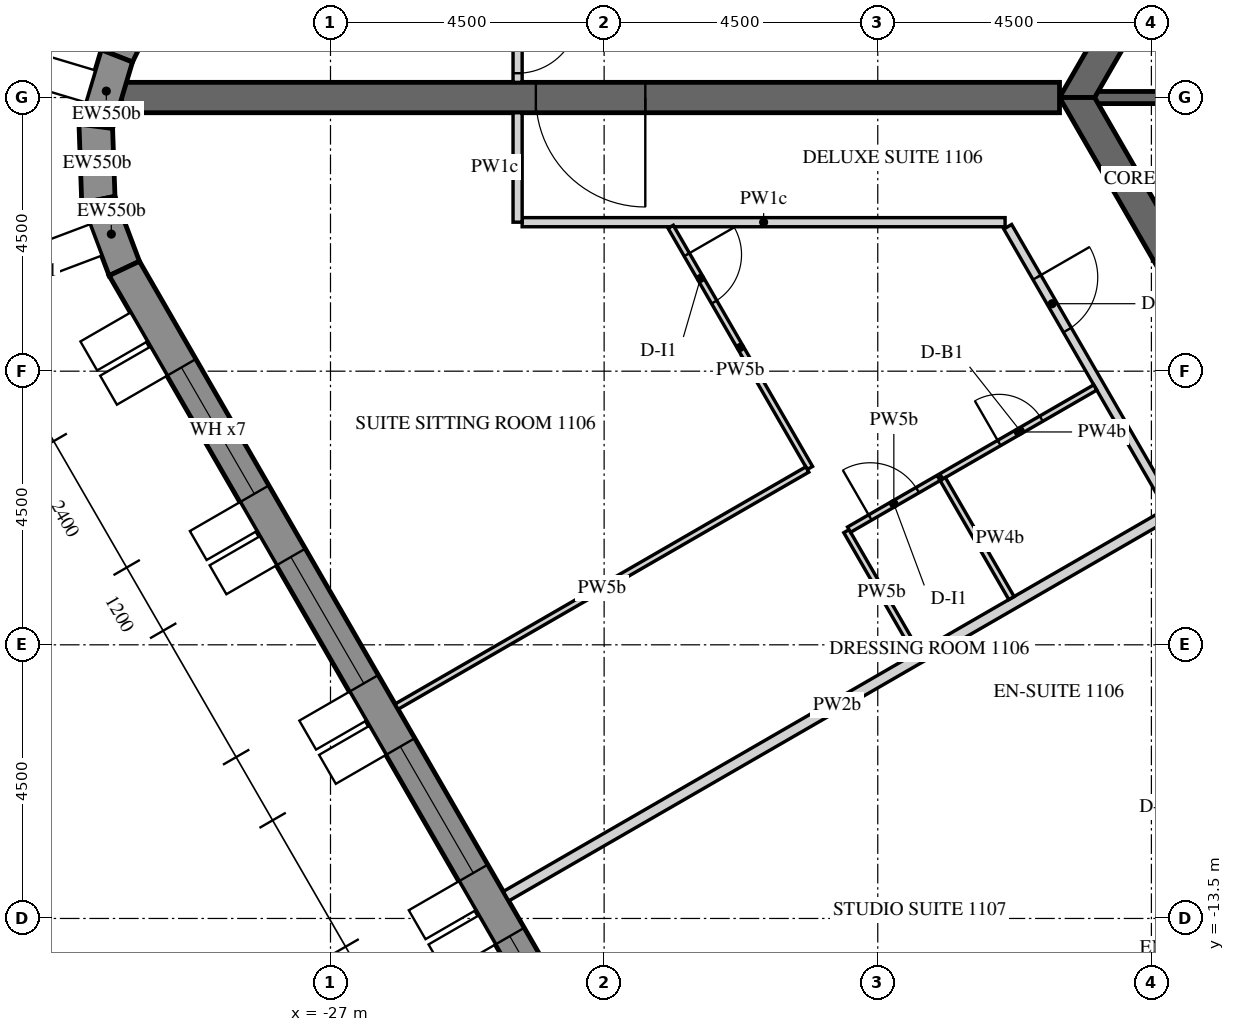
"""IFC4 building model, lengths in metres.
Left out: names, types, materials, properties, quantities, classifications, styles, units other than length and angle.
Written with IfcOpenShell. Run it as: python <this file> out.ifc"""

import sys

from ifc_helpers import new_model, si_unit, direction, frame, frame_2d, origin, place, context, subcontext, project, spatial, polyline, rectangle, outline, extrude, element, fill, save


model = new_model("IFC4")
c1 = context("Model", 3, precision=1e-05, world=origin(), true_north=direction((0.0, 1.0)))
c2 = subcontext(c1, "Body", "Model", "MODEL_VIEW")
j1 = project(units=[si_unit("LENGTHUNIT", "METRE"), si_unit("PLANEANGLEUNIT", "RADIAN")], contexts=[c1])
p1 = place(None, origin())
s1 = spatial("IfcSite", under=j1, at=p1, CompositionType="ELEMENT")
p2 = place(p1, origin())
s2 = spatial("IfcBuilding", under=s1, at=p2, CompositionType="ELEMENT")
p3 = place(p2, frame((0.0, 0.0, 152.7)))
s3 = spatial("IfcBuildingStorey", under=s2, at=p3, CompositionType="ELEMENT", Elevation=152.7)
p4 = place(p3, frame((-18.345, 25.633, 0.0), z_axis=(0.0, 0.0, 1.0), x_axis=(-0.43837181828, -0.898793718791, 0.0)))
e1 = element("IfcWall", 1, at=p4, inside=s3, PredefinedType="SOLIDWALL", context=c2, shape_type="SweptSolid", body=[
    extrude(outline(polyline([(-0.026, -0.275), (27.78, -0.275), (27.735, 0.275), (0.026, 0.275), (-0.026, -0.275)])), origin(), (0.0, 0.0, 1.0), 3.75),
])
p5 = place(p4, frame((1.879, 0.0, 0.9)))
e2 = element("IfcOpeningElement", 2, at=p5, cuts=e1, PredefinedType="OPENING", context=c2, shape_type="SweptSolid", body=[
    extrude(rectangle(XDim=2.4, YDim=2.4, at=frame_2d((1.2, 1.2))), frame((0.0, 0.285, 0.0), z_axis=(0.0, -1.0, 0.0), x_axis=(1.0, 0.0, 0.0)), (0.0, 0.0, 1.0), 0.57),
])
p6 = place(p4, frame((5.479, 0.0, 0.9)))
e3 = element("IfcOpeningElement", 3, at=p6, cuts=e1, PredefinedType="OPENING", context=c2, shape_type="SweptSolid", body=[
    extrude(rectangle(XDim=2.4, YDim=2.4, at=frame_2d((1.2, 1.2))), frame((0.0, 0.285, 0.0), z_axis=(0.0, -1.0, 0.0), x_axis=(1.0, 0.0, 0.0)), (0.0, 0.0, 1.0), 0.57),
])
p7 = place(p4, frame((9.079, 0.0, 0.9)))
e4 = element("IfcOpeningElement", 4, at=p7, cuts=e1, PredefinedType="OPENING", context=c2, shape_type="SweptSolid", body=[
    extrude(rectangle(XDim=2.4, YDim=2.4, at=frame_2d((1.2, 1.2))), frame((0.0, 0.285, 0.0), z_axis=(0.0, -1.0, 0.0), x_axis=(1.0, 0.0, 0.0)), (0.0, 0.0, 1.0), 0.57),
])
p8 = place(p4, frame((12.679, 0.0, 0.9)))
e5 = element("IfcOpeningElement", 5, at=p8, cuts=e1, PredefinedType="OPENING", context=c2, shape_type="SweptSolid", body=[
    extrude(rectangle(XDim=2.4, YDim=2.4, at=frame_2d((1.2, 1.2))), frame((0.0, 0.285, 0.0), z_axis=(0.0, -1.0, 0.0), x_axis=(1.0, 0.0, 0.0)), (0.0, 0.0, 1.0), 0.57),
])
p9 = place(p4, frame((16.279, 0.0, 0.9)))
e6 = element("IfcOpeningElement", 6, at=p9, cuts=e1, PredefinedType="OPENING", context=c2, shape_type="SweptSolid", body=[
    extrude(rectangle(XDim=2.4, YDim=2.4, at=frame_2d((1.2, 1.2))), frame((0.0, 0.285, 0.0), z_axis=(0.0, -1.0, 0.0), x_axis=(1.0, 0.0, 0.0)), (0.0, 0.0, 1.0), 0.57),
])
p10 = place(p4, frame((19.879, 0.0, 0.9)))
e7 = element("IfcOpeningElement", 7, at=p10, cuts=e1, PredefinedType="OPENING", context=c2, shape_type="SweptSolid", body=[
    extrude(rectangle(XDim=2.4, YDim=2.4, at=frame_2d((1.2, 1.2))), frame((0.0, 0.285, 0.0), z_axis=(0.0, -1.0, 0.0), x_axis=(1.0, 0.0, 0.0)), (0.0, 0.0, 1.0), 0.57),
])
p11 = place(p4, frame((23.479, 0.0, 0.9)))
e8 = element("IfcOpeningElement", 8, at=p11, cuts=e1, PredefinedType="OPENING", context=c2, shape_type="SweptSolid", body=[
    extrude(rectangle(XDim=2.4, YDim=2.4, at=frame_2d((1.2, 1.2))), frame((0.0, 0.285, 0.0), z_axis=(0.0, -1.0, 0.0), x_axis=(1.0, 0.0, 0.0)), (0.0, 0.0, 1.0), 0.57),
])
p12 = place(p3, frame((-30.513, 0.684, 0.0), z_axis=(0.0, 0.0, 1.0), x_axis=(-0.286736058109, -0.958009620505, 0.0)))
e9 = element("IfcWall", 9, at=p12, inside=s3, PredefinedType="SOLIDWALL", context=c2, shape_type="SweptSolid", body=[
    extrude(outline(polyline([(-0.022, -0.275), (1.253, -0.275), (1.163, 0.275), (0.022, 0.275), (-0.022, -0.275)])), origin(), (0.0, 0.0, 1.0), 3.75),
])
p13 = place(p3, frame((-30.86, -0.473, 0.0), z_axis=(0.0, 0.0, 1.0), x_axis=(0.03495638276, -0.999388838893, 0.0)))
e10 = element("IfcWall", 10, at=p13, inside=s3, PredefinedType="SOLIDWALL", context=c2, shape_type="SweptSolid", body=[
    extrude(outline(polyline([(-0.045, -0.275), (1.253, -0.275), (1.163, 0.275), (0.045, 0.275), (-0.045, -0.275)])), origin(), (0.0, 0.0, 1.0), 3.75),
])
p14 = place(p3, frame((-30.817, -1.681, 0.0), z_axis=(0.0, 0.0, 1.0), x_axis=(0.352850303963, -0.935679786569, 0.0)))
e11 = element("IfcWall", 11, at=p14, inside=s3, PredefinedType="SOLIDWALL", context=c2, shape_type="SweptSolid", body=[
    extrude(outline(polyline([(-0.045, -0.275), (1.23, -0.275), (1.186, 0.275), (0.045, 0.275), (-0.045, -0.275)])), origin(), (0.0, 0.0, 1.0), 3.75),
])
p15 = place(p3, frame((-30.391, -2.811, 0.0), z_axis=(0.0, 0.0, 1.0), x_axis=(0.499998569178, -0.866026229868, 0.0)))
e12 = element("IfcWall", 12, at=p15, inside=s3, PredefinedType="SOLIDWALL", context=c2, shape_type="SweptSolid", body=[
    extrude(outline(polyline([(-0.022, -0.275), (27.783, -0.275), (27.732, 0.275), (0.022, 0.275), (-0.022, -0.275)])), origin(), (0.0, 0.0, 1.0), 3.75),
])
p16 = place(p15, frame((1.879, 0.0, 0.9)))
e13 = element("IfcOpeningElement", 13, at=p16, cuts=e12, PredefinedType="OPENING", context=c2, shape_type="SweptSolid", body=[
    extrude(rectangle(XDim=2.4, YDim=2.4, at=frame_2d((1.2, 1.2))), frame((0.0, 0.285, 0.0), z_axis=(0.0, -1.0, 0.0), x_axis=(1.0, 0.0, 0.0)), (0.0, 0.0, 1.0), 0.57),
])
p17 = place(p15, frame((5.479, 0.0, 0.9)))
e14 = element("IfcOpeningElement", 14, at=p17, cuts=e12, PredefinedType="OPENING", context=c2, shape_type="SweptSolid", body=[
    extrude(rectangle(XDim=2.4, YDim=2.4, at=frame_2d((1.2, 1.2))), frame((0.0, 0.285, 0.0), z_axis=(0.0, -1.0, 0.0), x_axis=(1.0, 0.0, 0.0)), (0.0, 0.0, 1.0), 0.57),
])
p18 = place(p15, frame((9.079, 0.0, 0.9)))
e15 = element("IfcOpeningElement", 15, at=p18, cuts=e12, PredefinedType="OPENING", context=c2, shape_type="SweptSolid", body=[
    extrude(rectangle(XDim=2.4, YDim=2.4, at=frame_2d((1.2, 1.2))), frame((0.0, 0.285, 0.0), z_axis=(0.0, -1.0, 0.0), x_axis=(1.0, 0.0, 0.0)), (0.0, 0.0, 1.0), 0.57),
])
p19 = place(p15, frame((12.679, 0.0, 0.9)))
e16 = element("IfcOpeningElement", 16, at=p19, cuts=e12, PredefinedType="OPENING", context=c2, shape_type="SweptSolid", body=[
    extrude(rectangle(XDim=2.4, YDim=2.4, at=frame_2d((1.2, 1.2))), frame((0.0, 0.285, 0.0), z_axis=(0.0, -1.0, 0.0), x_axis=(1.0, 0.0, 0.0)), (0.0, 0.0, 1.0), 0.57),
])
p20 = place(p15, frame((16.279, 0.0, 0.9)))
e17 = element("IfcOpeningElement", 17, at=p20, cuts=e12, PredefinedType="OPENING", context=c2, shape_type="SweptSolid", body=[
    extrude(rectangle(XDim=2.4, YDim=2.4, at=frame_2d((1.2, 1.2))), frame((0.0, 0.285, 0.0), z_axis=(0.0, -1.0, 0.0), x_axis=(1.0, 0.0, 0.0)), (0.0, 0.0, 1.0), 0.57),
])
p21 = place(p15, frame((19.879, 0.0, 0.9)))
e18 = element("IfcOpeningElement", 18, at=p21, cuts=e12, PredefinedType="OPENING", context=c2, shape_type="SweptSolid", body=[
    extrude(rectangle(XDim=2.4, YDim=2.4, at=frame_2d((1.2, 1.2))), frame((0.0, 0.285, 0.0), z_axis=(0.0, -1.0, 0.0), x_axis=(1.0, 0.0, 0.0)), (0.0, 0.0, 1.0), 0.57),
])
p22 = place(p15, frame((23.479, 0.0, 0.9)))
e19 = element("IfcOpeningElement", 19, at=p22, cuts=e12, PredefinedType="OPENING", context=c2, shape_type="SweptSolid", body=[
    extrude(rectangle(XDim=2.4, YDim=2.4, at=frame_2d((1.2, 1.2))), frame((0.0, 0.285, 0.0), z_axis=(0.0, -1.0, 0.0), x_axis=(1.0, 0.0, 0.0)), (0.0, 0.0, 1.0), 0.57),
])
p23 = place(p3, frame((-7.361, 12.75, 0.0), z_axis=(0.0, 0.0, 1.0), x_axis=(-0.50000571537, -0.866022103989, 0.0)))
e20 = element("IfcWall", 20, at=p23, inside=s3, PredefinedType="SHEAR", context=c2, shape_type="SweptSolid", body=[
    extrude(outline(polyline([(-0.144, -0.25), (14.867, -0.25), (14.578, 0.25), (0.144, 0.25), (-0.144, -0.25)])), origin(), (0.0, 0.0, 1.0), 3.75),
])
p24 = place(p23, frame((6.49, 0.0, 0.0)))
e21 = element("IfcOpeningElement", 21, at=p24, cuts=e20, PredefinedType="OPENING", context=c2, shape_type="SweptSolid", body=[
    extrude(rectangle(XDim=1.8, YDim=2.4, at=frame_2d((0.9, 1.2))), frame((0.0, 0.26, 0.0), z_axis=(0.0, -1.0, 0.0), x_axis=(1.0, 0.0, 0.0)), (0.0, 0.0, 1.0), 0.52),
])
p25 = place(p3, frame((-14.722, 0.0, 0.0), z_axis=(0.0, 0.0, 1.0), x_axis=(0.50000571537, -0.866022103989, 0.0)))
e22 = element("IfcWall", 22, at=p25, inside=s3, PredefinedType="SHEAR", context=c2, shape_type="SweptSolid", body=[
    extrude(outline(polyline([(-0.144, -0.25), (14.867, -0.25), (14.578, 0.25), (0.144, 0.25), (-0.144, -0.25)])), origin(), (0.0, 0.0, 1.0), 3.75),
])
p26 = place(p25, frame((6.432, 0.0, 0.0)))
e23 = element("IfcOpeningElement", 23, at=p26, cuts=e22, PredefinedType="OPENING", context=c2, shape_type="SweptSolid", body=[
    extrude(rectangle(XDim=1.8, YDim=2.4, at=frame_2d((0.9, 1.2))), frame((0.0, 0.26, 0.0), z_axis=(0.0, -1.0, 0.0), x_axis=(1.0, 0.0, 0.0)), (0.0, 0.0, 1.0), 0.52),
])
p27 = place(p3, frame((-15.011, 0.0, 0.0), z_axis=(0.0, 0.0, 1.0), x_axis=(-1.0, 0.0, 0.0)))
e24 = element("IfcWall", 24, at=p27, inside=s3, PredefinedType="SHEAR", context=c2, shape_type="SweptSolid", body=[
    extrude(rectangle(XDim=15.424, YDim=0.5, at=frame_2d((7.712, 0.0))), origin(), (0.0, 0.0, 1.0), 3.75),
])
p28 = place(p27, frame((6.812, 0.0, 0.0)))
e25 = element("IfcOpeningElement", 25, at=p28, cuts=e24, PredefinedType="OPENING", context=c2, shape_type="SweptSolid", body=[
    extrude(rectangle(XDim=1.8, YDim=2.4, at=frame_2d((0.9, 1.2))), frame((0.0, 0.26, 0.0), z_axis=(0.0, -1.0, 0.0), x_axis=(1.0, 0.0, 0.0)), (0.0, 0.0, 1.0), 0.52),
])
p29 = place(p3, frame((-11.547, 0.0, 0.0), z_axis=(0.0, 0.0, 1.0), x_axis=(-1.0, 0.0, 0.0)))
e26 = element("IfcWall", 26, at=p29, inside=s3, PredefinedType="SHEAR", context=c2, shape_type="SweptSolid", body=[
    extrude(rectangle(XDim=2.887, YDim=0.2, at=frame_2d((1.443, 0.0))), origin(), (0.0, 0.0, 1.0), 3.75),
])
p30 = place(p3, frame((-23.923, 1.975, 0.0), z_axis=(0.0, 0.0, 1.0), x_axis=(0.0, -1.0, 0.0)))
e27 = element("IfcWall", 27, at=p30, inside=s3, PredefinedType="PARTITIONING", context=c2, shape_type="SweptSolid", body=[
    extrude(rectangle(XDim=1.725, YDim=0.15, at=frame_2d((0.863, 0.0))), origin(), (0.0, 0.0, 1.0), 2.823),
])
p31 = place(p30, frame((0.575, 0.0, 0.0)))
e28 = element("IfcOpeningElement", 28, at=p31, cuts=e27, PredefinedType="OPENING", context=c2, shape_type="SweptSolid", body=[
    extrude(rectangle(XDim=1.0, YDim=2.1, at=frame_2d((0.5, 1.05))), frame((0.0, 0.085, 0.0), z_axis=(0.0, -1.0, 0.0), x_axis=(1.0, 0.0, 0.0)), (0.0, 0.0, 1.0), 0.17),
])
p32 = place(p3, frame((-23.848, -2.05, 0.0), z_axis=(0.0, 0.0, 1.0), x_axis=(1.0, 0.0, 0.0)))
e29 = element("IfcWall", 29, at=p32, inside=s3, PredefinedType="PARTITIONING", context=c2, shape_type="SweptSolid", body=[
    extrude(rectangle(XDim=7.942, YDim=0.15, at=frame_2d((3.971, 0.0))), origin(), (0.0, 0.0, 1.0), 2.823),
])
p33 = place(p3, frame((-15.863, -2.125, 0.0), z_axis=(0.0, 0.0, 1.0), x_axis=(0.500008833422, -0.866020303746, 0.0)))
e30 = element("IfcWall", 30, at=p33, inside=s3, PredefinedType="PARTITIONING", context=c2, shape_type="SweptSolid", body=[
    extrude(rectangle(XDim=14.636, YDim=0.15, at=frame_2d((7.318, 0.0))), origin(), (0.0, 0.0, 1.0), 2.823),
])
p34 = place(p33, frame((0.961, 0.0, 0.0)))
e31 = element("IfcOpeningElement", 31, at=p34, cuts=e30, PredefinedType="OPENING", context=c2, shape_type="SweptSolid", body=[
    extrude(rectangle(XDim=1.0, YDim=2.1, at=frame_2d((0.5, 1.05))), frame((0.0, 0.085, 0.0), z_axis=(0.0, -1.0, 0.0), x_axis=(1.0, 0.0, 0.0)), (0.0, 0.0, 1.0), 0.17),
])
p35 = place(p33, frame((7.309, 0.0, 0.0)))
e32 = element("IfcOpeningElement", 32, at=p35, cuts=e30, PredefinedType="OPENING", context=c2, shape_type="SweptSolid", body=[
    extrude(rectangle(XDim=1.0, YDim=2.1, at=frame_2d((0.5, 1.05))), frame((0.0, 0.085, 0.0), z_axis=(0.0, -1.0, 0.0), x_axis=(1.0, 0.0, 0.0)), (0.0, 0.0, 1.0), 0.17),
])
p36 = place(p33, frame((13.486, 0.0, 0.0)))
e33 = element("IfcOpeningElement", 33, at=p36, cuts=e30, PredefinedType="OPENING", context=c2, shape_type="SweptSolid", body=[
    extrude(rectangle(XDim=1.0, YDim=2.1, at=frame_2d((0.5, 1.05))), frame((0.0, 0.085, 0.0), z_axis=(0.0, -1.0, 0.0), x_axis=(1.0, 0.0, 0.0)), (0.0, 0.0, 1.0), 0.17),
])
p37 = place(p3, frame((-23.923, -0.25, 0.0), z_axis=(0.0, 0.0, 1.0), x_axis=(0.0, -1.0, 0.0)))
e34 = element("IfcWall", 34, at=p37, inside=s3, PredefinedType="PARTITIONING", context=c2, shape_type="SweptSolid", body=[
    extrude(rectangle(XDim=1.8, YDim=0.15, at=frame_2d((0.9, 0.0))), origin(), (0.0, 0.0, 1.0), 2.823),
])
p38 = place(p3, frame((-16.956, -6.231, 0.0), z_axis=(0.0, 0.0, 1.0), x_axis=(0.866046596414, 0.499963291492, 0.0)))
e35 = element("IfcWall", 35, at=p38, inside=s3, PredefinedType="PARTITIONING", context=c2, shape_type="SweptSolid", body=[
    extrude(rectangle(XDim=2.925, YDim=0.1, at=frame_2d((1.462, 0.0))), origin(), (0.0, 0.0, 1.0), 2.823),
])
p39 = place(p38, frame((1.1, 0.0, 0.0)))
e36 = element("IfcOpeningElement", 36, at=p39, cuts=e35, PredefinedType="OPENING", context=c2, shape_type="SweptSolid", body=[
    extrude(rectangle(XDim=0.8, YDim=2.1, at=frame_2d((0.4, 1.05))), frame((0.0, 0.06, 0.0), z_axis=(0.0, -1.0, 0.0), x_axis=(1.0, 0.0, 0.0)), (0.0, 0.0, 1.0), 0.12),
])
p40 = place(p3, frame((-17.36, -9.131, 0.0), z_axis=(0.0, 0.0, 1.0), x_axis=(-0.500015210774, 0.866016621662, 0.0)))
e37 = element("IfcWall", 37, at=p40, inside=s3, PredefinedType="PARTITIONING", context=c2, shape_type="SweptSolid", body=[
    extrude(rectangle(XDim=2.31, YDim=0.1, at=frame_2d((1.155, 0.0))), origin(), (0.0, 0.0, 1.0), 2.823),
])
p41 = place(p3, frame((-18.472, -7.106, 0.0), z_axis=(0.0, 0.0, 1.0), x_axis=(0.866087547558, 0.499892348375, 0.0)))
e38 = element("IfcWall", 38, at=p41, inside=s3, PredefinedType="PARTITIONING", context=c2, shape_type="SweptSolid", body=[
    extrude(rectangle(XDim=1.7, YDim=0.1, at=frame_2d((0.85, 0.0))), origin(), (0.0, 0.0, 1.0), 2.823),
])
p42 = place(p41, frame((0.4, 0.0, 0.0)))
e39 = element("IfcOpeningElement", 39, at=p42, cuts=e38, PredefinedType="OPENING", context=c2, shape_type="SweptSolid", body=[
    extrude(rectangle(XDim=0.9, YDim=2.1, at=frame_2d((0.45, 1.05))), frame((0.0, 0.06, 0.0), z_axis=(0.0, -1.0, 0.0), x_axis=(1.0, 0.0, 0.0)), (0.0, 0.0, 1.0), 0.12),
])
p43 = place(p3, frame((-21.405, -2.125, 0.0), z_axis=(0.0, 0.0, 1.0), x_axis=(0.49999161165, -0.866030246746, 0.0)))
e40 = element("IfcWall", 40, at=p43, inside=s3, PredefinedType="PARTITIONING", context=c2, shape_type="SweptSolid", body=[
    extrude(rectangle(XDim=4.58, YDim=0.1, at=frame_2d((2.29, 0.0))), origin(), (0.0, 0.0, 1.0), 2.823),
])
p44 = place(p43, frame((0.53, 0.0, 0.0)))
e41 = element("IfcOpeningElement", 41, at=p44, cuts=e40, PredefinedType="OPENING", context=c2, shape_type="SweptSolid", body=[
    extrude(rectangle(XDim=0.9, YDim=2.1, at=frame_2d((0.45, 1.05))), frame((0.0, 0.06, 0.0), z_axis=(0.0, -1.0, 0.0), x_axis=(1.0, 0.0, 0.0)), (0.0, 0.0, 1.0), 0.12),
])
p45 = place(p3, frame((-19.158, -6.116, 0.0), z_axis=(0.0, 0.0, 1.0), x_axis=(-0.866021400173, -0.500006934395, 0.0)))
e42 = element("IfcWall", 42, at=p45, inside=s3, PredefinedType="PARTITIONING", context=c2, shape_type="SweptSolid", body=[
    extrude(rectangle(XDim=7.8, YDim=0.1, at=frame_2d((3.9, 0.0))), origin(), (0.0, 0.0, 1.0), 2.823),
])
p46 = place(p3, frame((-24.114, -13.134, 0.0), z_axis=(0.0, 0.0, 1.0), x_axis=(0.866024255907, 0.500001988177, 0.0)))
e43 = element("IfcWall", 43, at=p46, inside=s3, PredefinedType="PARTITIONING", context=c2, shape_type="SweptSolid", body=[
    extrude(rectangle(XDim=12.575, YDim=0.18, at=frame_2d((6.288, 0.0))), origin(), (0.0, 0.0, 1.0), 2.823),
])
p47 = place(p3, frame((-16.931, -6.274, 0.0), z_axis=(0.0, 0.0, 1.0), x_axis=(0.500077800282, -0.865980481111, 0.0)))
e44 = element("IfcWall", 44, at=p47, inside=s3, PredefinedType="PARTITIONING", context=c2, shape_type="SweptSolid", body=[
    extrude(rectangle(XDim=2.26, YDim=0.1, at=frame_2d((1.13, 0.0))), origin(), (0.0, 0.0, 1.0), 2.823),
])
p48 = place(p3, frame((-20.513, -19.37, 0.0), z_axis=(0.0, 0.0, 1.0), x_axis=(0.866019402111, 0.500010395058, 0.0)))
e45 = element("IfcWall", 45, at=p48, inside=s3, PredefinedType="PARTITIONING", context=c2, shape_type="SweptSolid", body=[
    extrude(rectangle(XDim=12.575, YDim=0.18, at=frame_2d((6.288, 0.0))), origin(), (0.0, 0.0, 1.0), 2.823),
])
p49 = place(p16, frame((0.0, 0.205, 0.0)))
e46 = element("IfcWindow", 46, at=p49, inside=s3, PartitioningType="DOUBLE_PANEL_VERTICAL", PredefinedType="WINDOW", context=c2, shape_type="SweptSolid", body=[
    extrude(rectangle(XDim=2.4, YDim=2.4, at=frame_2d((1.2, 1.2))), frame((0.0, 0.03, 0.0), z_axis=(0.0, -1.0, 0.0), x_axis=(1.0, 0.0, 0.0)), (0.0, 0.0, 1.0), 0.06),
])
fill(e13, e46)
p50 = place(p17, frame((0.0, 0.205, 0.0)))
e47 = element("IfcWindow", 47, at=p50, inside=s3, PartitioningType="DOUBLE_PANEL_VERTICAL", PredefinedType="WINDOW", context=c2, shape_type="SweptSolid", body=[
    extrude(rectangle(XDim=2.4, YDim=2.4, at=frame_2d((1.2, 1.2))), frame((0.0, 0.03, 0.0), z_axis=(0.0, -1.0, 0.0), x_axis=(1.0, 0.0, 0.0)), (0.0, 0.0, 1.0), 0.06),
])
fill(e14, e47)
p51 = place(p18, frame((0.0, 0.205, 0.0)))
e48 = element("IfcWindow", 48, at=p51, inside=s3, PartitioningType="DOUBLE_PANEL_VERTICAL", PredefinedType="WINDOW", context=c2, shape_type="SweptSolid", body=[
    extrude(rectangle(XDim=2.4, YDim=2.4, at=frame_2d((1.2, 1.2))), frame((0.0, 0.03, 0.0), z_axis=(0.0, -1.0, 0.0), x_axis=(1.0, 0.0, 0.0)), (0.0, 0.0, 1.0), 0.06),
])
fill(e15, e48)
p52 = place(p19, frame((0.0, 0.205, 0.0)))
e49 = element("IfcWindow", 49, at=p52, inside=s3, PartitioningType="DOUBLE_PANEL_VERTICAL", PredefinedType="WINDOW", context=c2, shape_type="SweptSolid", body=[
    extrude(rectangle(XDim=2.4, YDim=2.4, at=frame_2d((1.2, 1.2))), frame((0.0, 0.03, 0.0), z_axis=(0.0, -1.0, 0.0), x_axis=(1.0, 0.0, 0.0)), (0.0, 0.0, 1.0), 0.06),
])
fill(e16, e49)
p53 = place(p28, origin())
e50 = element("IfcDoor", 50, at=p53, inside=s3, OperationType="DOUBLE_DOOR_SINGLE_SWING", PredefinedType="DOOR", context=c2, shape_type="SweptSolid", body=[
    extrude(rectangle(XDim=1.8, YDim=2.4, at=frame_2d((0.9, 1.2))), frame((0.0, 0.025, 0.0), z_axis=(0.0, -1.0, 0.0), x_axis=(1.0, 0.0, 0.0)), (0.0, 0.0, 1.0), 0.05),
])
fill(e25, e50)
p54 = place(p31, origin())
e51 = element("IfcDoor", 51, at=p54, inside=s3, OperationType="SINGLE_SWING_LEFT", PredefinedType="DOOR", context=c2, shape_type="SweptSolid", body=[
    extrude(rectangle(XDim=1.0, YDim=2.1, at=frame_2d((0.5, 1.05))), frame((0.0, 0.025, 0.0), z_axis=(0.0, -1.0, 0.0), x_axis=(1.0, 0.0, 0.0)), (0.0, 0.0, 1.0), 0.05),
])
fill(e28, e51)
p55 = place(p34, origin())
e52 = element("IfcDoor", 52, at=p55, inside=s3, OperationType="SINGLE_SWING_RIGHT", PredefinedType="DOOR", context=c2, shape_type="SweptSolid", body=[
    extrude(rectangle(XDim=1.0, YDim=2.1, at=frame_2d((0.5, 1.05))), frame((0.0, 0.025, 0.0), z_axis=(0.0, -1.0, 0.0), x_axis=(1.0, 0.0, 0.0)), (0.0, 0.0, 1.0), 0.05),
])
fill(e31, e52)
p56 = place(p39, origin())
e53 = element("IfcDoor", 53, at=p56, inside=s3, OperationType="SINGLE_SWING_LEFT", PredefinedType="DOOR", context=c2, shape_type="SweptSolid", body=[
    extrude(rectangle(XDim=0.8, YDim=2.1, at=frame_2d((0.4, 1.05))), frame((0.0, 0.025, 0.0), z_axis=(0.0, -1.0, 0.0), x_axis=(1.0, 0.0, 0.0)), (0.0, 0.0, 1.0), 0.05),
])
fill(e36, e53)
p57 = place(p42, origin())
e54 = element("IfcDoor", 54, at=p57, inside=s3, OperationType="SINGLE_SWING_RIGHT", PredefinedType="DOOR", context=c2, shape_type="SweptSolid", body=[
    extrude(rectangle(XDim=0.9, YDim=2.1, at=frame_2d((0.45, 1.05))), frame((0.0, 0.025, 0.0), z_axis=(0.0, -1.0, 0.0), x_axis=(1.0, 0.0, 0.0)), (0.0, 0.0, 1.0), 0.05),
])
fill(e39, e54)
p58 = place(p44, origin())
e55 = element("IfcDoor", 55, at=p58, inside=s3, OperationType="SINGLE_SWING_RIGHT", PredefinedType="DOOR", context=c2, shape_type="SweptSolid", body=[
    extrude(rectangle(XDim=0.9, YDim=2.1, at=frame_2d((0.45, 1.05))), frame((0.0, 0.025, 0.0), z_axis=(0.0, -1.0, 0.0), x_axis=(1.0, 0.0, 0.0)), (0.0, 0.0, 1.0), 0.05),
])
fill(e41, e55)
save(model, sys.argv[1])
